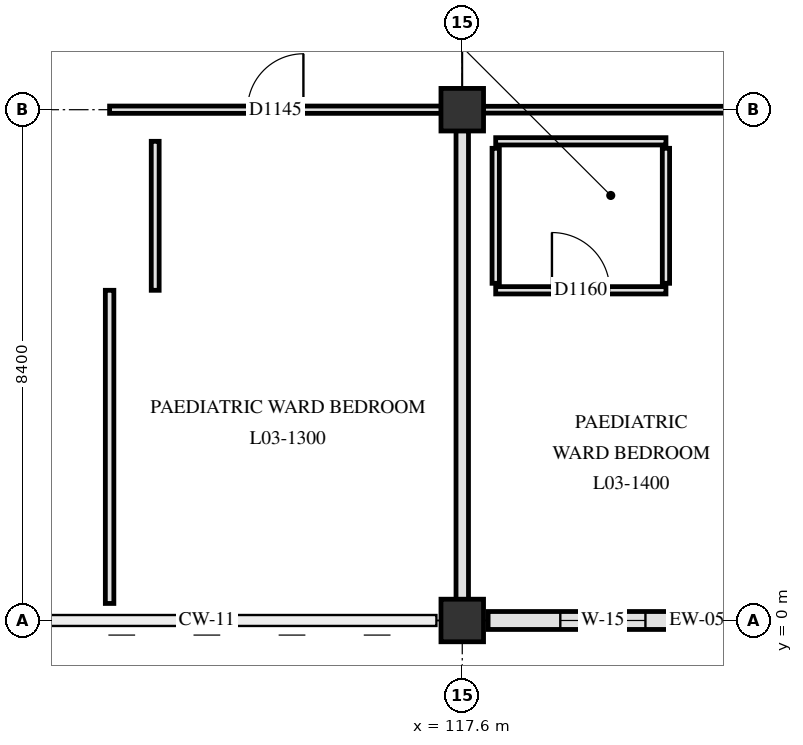
"""IFC4 building model, lengths in metres.
Left out: names, types, materials, properties, quantities, classifications, styles, units other than length and angle.
Written with IfcOpenShell. Run it as: python <this file> out.ifc"""

import sys

from ifc_helpers import new_model, si_unit, direction, frame, frame_2d, origin, origin_2d, place, context, subcontext, project, spatial, rectangle, extrude, element, fill, save


model = new_model("IFC4")
c1 = context("Model", 3, precision=1e-05, world=origin(), true_north=direction((0.0, 1.0)))
c2 = subcontext(c1, "Body", "Model", "MODEL_VIEW")
j1 = project(units=[si_unit("LENGTHUNIT", "METRE"), si_unit("PLANEANGLEUNIT", "RADIAN")], contexts=[c1])
p1 = place(None, origin())
s1 = spatial("IfcSite", under=j1, at=p1, CompositionType="ELEMENT")
p2 = place(p1, origin())
s2 = spatial("IfcBuilding", under=s1, at=p2, CompositionType="ELEMENT")
p3 = place(p2, frame((0.0, 0.0, 14.4)))
s3 = spatial("IfcBuildingStorey", under=s2, at=p3, CompositionType="ELEMENT", Elevation=14.4)
for number, where, z_axis, x_axis in (
    (1, (117.6, 0.0, 0.0), (0.0, 0.0, 1.0), (1.0, 0.0, 0.0)),
    (2, (117.6, 8.4, 0.0), (0.0, 0.0, 1.0), (1.0, 0.0, 0.0)),
):
    element("IfcColumn", number, at=place(p3, frame(where, z_axis=z_axis, x_axis=x_axis)), inside=s3, PredefinedType="COLUMN", context=c2, shape_type="SweptSolid", body=[
        extrude(rectangle(XDim=0.7, YDim=0.7, at=origin_2d()), origin(), (0.0, 0.0, 1.0), 4.2),
    ])
p4 = place(p3, frame((125.575, 0.0, 0.0), z_axis=(0.0, 0.0, 1.0), x_axis=(-1.0, 0.0, 0.0)))
e3 = element("IfcWall", 3, at=p4, inside=s3, PredefinedType="SOLIDWALL", context=c2, shape_type="SweptSolid", body=[
    extrude(rectangle(XDim=7.55, YDim=0.295, at=frame_2d((3.775, 0.0))), origin(), (0.0, 0.0, 1.0), 2.89),
])
p5 = place(p4, frame((1.238, 0.0, 0.85)))
e4 = element("IfcOpeningElement", 4, at=p5, cuts=e3, PredefinedType="OPENING", context=c2, shape_type="SweptSolid", body=[
    extrude(rectangle(XDim=1.3, YDim=1.42, at=frame_2d((0.65, 0.71))), frame((0.0, 0.157, 0.0), z_axis=(0.0, -1.0, 0.0), x_axis=(1.0, 0.0, 0.0)), (0.0, 0.0, 1.0), 0.315),
])
p6 = place(p4, frame((4.962, 0.0, 0.85)))
e5 = element("IfcOpeningElement", 5, at=p6, cuts=e3, PredefinedType="OPENING", context=c2, shape_type="SweptSolid", body=[
    extrude(rectangle(XDim=1.4, YDim=1.42, at=frame_2d((0.7, 0.71))), frame((0.0, 0.157, 0.0), z_axis=(0.0, -1.0, 0.0), x_axis=(1.0, 0.0, 0.0)), (0.0, 0.0, 1.0), 0.315),
])
p7 = place(p3, frame((118.15, 5.43, 0.0), z_axis=(0.0, 0.0, 1.0), x_axis=(1.0, 0.0, 0.0)))
e6 = element("IfcWall", 6, at=p7, inside=s3, PredefinedType="PARTITIONING", context=c2, shape_type="SweptSolid", body=[
    extrude(rectangle(XDim=2.8, YDim=0.12, at=frame_2d((1.4, 0.0))), origin(), (0.0, 0.0, 1.0), 3.89),
])
p8 = place(p7, frame((0.925, 0.0, 0.0)))
e7 = element("IfcOpeningElement", 7, at=p8, cuts=e6, PredefinedType="OPENING", context=c2, shape_type="SweptSolid", body=[
    extrude(rectangle(XDim=0.95, YDim=2.1, at=frame_2d((0.475, 1.05))), frame((0.0, 0.07, 0.0), z_axis=(0.0, -1.0, 0.0), x_axis=(1.0, 0.0, 0.0)), (0.0, 0.0, 1.0), 0.14),
])
p9 = place(p3, frame((118.15, 7.88, 0.0), z_axis=(0.0, 0.0, 1.0), x_axis=(1.0, 0.0, 0.0)))
e8 = element("IfcWall", 8, at=p9, inside=s3, PredefinedType="PARTITIONING", context=c2, shape_type="SweptSolid", body=[
    extrude(rectangle(XDim=2.8, YDim=0.12, at=frame_2d((1.4, 0.0))), origin(), (0.0, 0.0, 1.0), 3.89),
])
p10 = place(p3, frame((111.8, 8.4, 0.0), z_axis=(0.0, 0.0, 1.0), x_axis=(1.0, 0.0, 0.0)))
e9 = element("IfcWall", 9, at=p10, inside=s3, PredefinedType="PARTITIONING", context=c2, shape_type="SweptSolid", body=[
    extrude(rectangle(XDim=5.455, YDim=0.12, at=frame_2d((2.728, 0.0))), origin(), (0.0, 0.0, 1.0), 3.29),
])
p11 = place(p10, frame((2.268, 0.0, 0.0)))
e10 = element("IfcOpeningElement", 10, at=p11, cuts=e9, PredefinedType="OPENING", context=c2, shape_type="SweptSolid", body=[
    extrude(rectangle(XDim=0.92, YDim=2.08, at=frame_2d((0.46, 1.04))), frame((0.0, 0.07, 0.0), z_axis=(0.0, -1.0, 0.0), x_axis=(1.0, 0.0, 0.0)), (0.0, 0.0, 1.0), 0.14),
])
p12 = place(p3, frame((117.945, 8.4, 0.0), z_axis=(0.0, 0.0, 1.0), x_axis=(1.0, 0.0, 0.0)))
e11 = element("IfcWall", 11, at=p12, inside=s3, PredefinedType="PARTITIONING", context=c2, shape_type="SweptSolid", body=[
    extrude(rectangle(XDim=7.71, YDim=0.112, at=frame_2d((3.855, 0.0))), origin(), (0.0, 0.0, 1.0), 3.29),
])
p13 = place(p12, frame((4.125, 0.0, 0.0)))
e12 = element("IfcOpeningElement", 12, at=p13, cuts=e11, PredefinedType="OPENING", context=c2, shape_type="SweptSolid", body=[
    extrude(rectangle(XDim=1.7, YDim=2.25, at=frame_2d((0.85, 1.125))), frame((0.0, 0.066, 0.0), z_axis=(0.0, -1.0, 0.0), x_axis=(1.0, 0.0, 0.0)), (0.0, 0.0, 1.0), 0.132),
])
p14 = place(p3, frame((111.8, 0.28, 0.0), z_axis=(0.0, 0.0, 1.0), x_axis=(0.0, 1.0, 0.0)))
e13 = element("IfcWall", 13, at=p14, inside=s3, PredefinedType="PARTITIONING", context=c2, shape_type="SweptSolid", body=[
    extrude(rectangle(XDim=5.15, YDim=0.14, at=frame_2d((2.575, 0.0))), origin(), (0.0, 0.0, 1.0), 2.89),
])
p15 = place(p3, frame((112.55, 5.43, 0.0), z_axis=(0.0, 0.0, 1.0), x_axis=(0.0, 1.0, 0.0)))
e14 = element("IfcWall", 14, at=p15, inside=s3, PredefinedType="PARTITIONING", context=c2, shape_type="SweptSolid", body=[
    extrude(rectangle(XDim=2.45, YDim=0.13, at=frame_2d((1.225, 0.0))), origin(), (0.0, 0.0, 1.0), 3.89),
])
p16 = place(p3, frame((117.6, 0.345, 0.0), z_axis=(0.0, 0.0, 1.0), x_axis=(0.0, 1.0, 0.0)))
e15 = element("IfcWall", 15, at=p16, inside=s3, PredefinedType="PARTITIONING", context=c2, shape_type="SweptSolid", body=[
    extrude(rectangle(XDim=7.71, YDim=0.205, at=frame_2d((3.855, 0.0))), origin(), (0.0, 0.0, 1.0), 3.34),
])
for number, where, z_axis, x_axis in (
    (16, (118.15, 5.545, 0.0), (0.0, 0.0, 1.0), (0.0, 1.0, 0.0)),
    (17, (120.95, 5.545, 0.0), (0.0, 0.0, 1.0), (0.0, 1.0, 0.0)),
):
    element("IfcWall", number, at=place(p3, frame(where, z_axis=z_axis, x_axis=x_axis)), inside=s3, PredefinedType="PARTITIONING", context=c2, shape_type="SweptSolid", body=[
        extrude(rectangle(XDim=2.22, YDim=0.12, at=frame_2d((1.11, 0.0))), origin(), (0.0, 0.0, 1.0), 3.89),
    ])
p17 = place(p6, origin())
e18 = element("IfcWindow", 18, at=p17, inside=s3, PartitioningType="SINGLE_PANEL", PredefinedType="WINDOW", context=c2, shape_type="SweptSolid", body=[
    extrude(rectangle(XDim=1.4, YDim=1.42, at=frame_2d((0.7, 0.71))), frame((0.0, 0.03, 0.0), z_axis=(0.0, -1.0, 0.0), x_axis=(1.0, 0.0, 0.0)), (0.0, 0.0, 1.0), 0.06),
])
fill(e5, e18)
p18 = place(p11, origin())
e19 = element("IfcDoor", 19, at=p18, inside=s3, OperationType="SINGLE_SWING_RIGHT", PredefinedType="DOOR", context=c2, shape_type="SweptSolid", body=[
    extrude(rectangle(XDim=0.92, YDim=2.08, at=frame_2d((0.46, 1.04))), frame((0.0, 0.025, 0.0), z_axis=(0.0, -1.0, 0.0), x_axis=(1.0, 0.0, 0.0)), (0.0, 0.0, 1.0), 0.05),
])
fill(e10, e19)
p19 = place(p8, origin())
e20 = element("IfcDoor", 20, at=p19, inside=s3, OperationType="SINGLE_SWING_LEFT", PredefinedType="DOOR", context=c2, shape_type="SweptSolid", body=[
    extrude(rectangle(XDim=0.95, YDim=2.1, at=frame_2d((0.475, 1.05))), frame((0.0, 0.025, 0.0), z_axis=(0.0, -1.0, 0.0), x_axis=(1.0, 0.0, 0.0)), (0.0, 0.0, 1.0), 0.05),
])
fill(e7, e20)
save(model, sys.argv[1])
